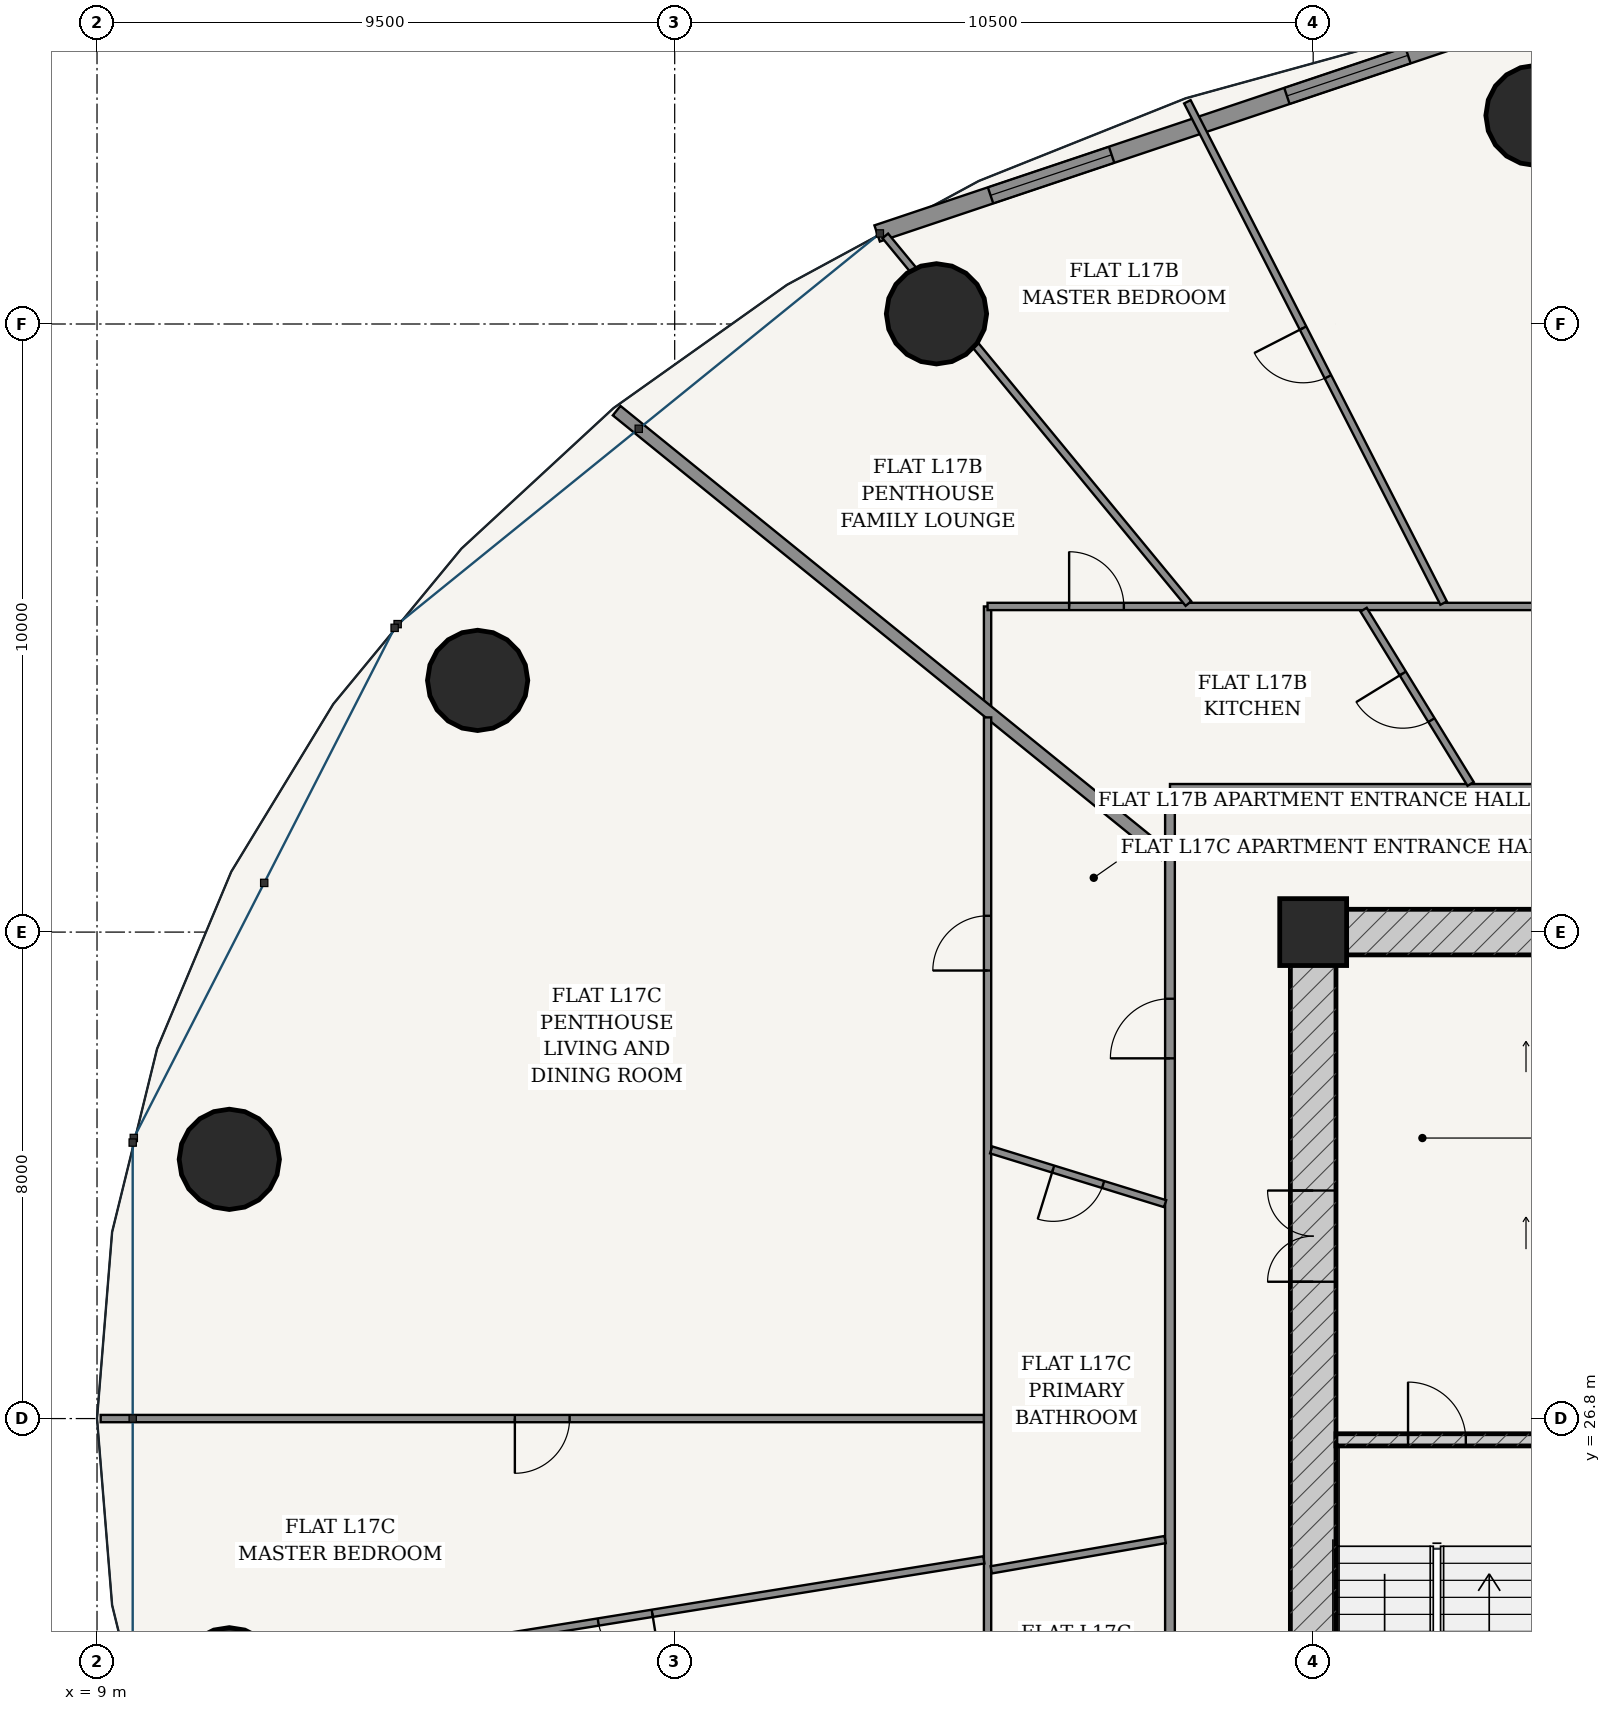
"""IFC4 building model, lengths in metres.
Left out: names, types, materials, properties, quantities, classifications, styles, units other than length and angle.
Written with IfcOpenShell. Run it as: python <this file> out.ifc"""

import sys

from ifc_helpers import new_model, si_unit, direction, frame, frame_2d, origin, origin_2d, place, context, subcontext, project, spatial, rectangle, hollow_circle, extrude, source, transform, mapped, element, fill, save


model = new_model("IFC4")
c1 = context("Model", 3, precision=1e-05, world=origin(), true_north=direction((-0.2419218956, 0.970295726276)))
c2 = subcontext(c1, "Body", "Model", "MODEL_VIEW")
j1 = project(units=[si_unit("LENGTHUNIT", "METRE"), si_unit("PLANEANGLEUNIT", "RADIAN")], contexts=[c1])
p1 = place(None, origin())
s1 = spatial("IfcSite", under=j1, at=p1, CompositionType="ELEMENT")
p2 = place(p1, origin())
s2 = spatial("IfcBuilding", under=s1, at=p2, CompositionType="ELEMENT")
p3 = place(p2, frame((0.0, 0.0, 67.2)))
s3 = spatial("IfcBuildingStorey", under=s2, at=p3, CompositionType="ELEMENT", Elevation=67.2)
p4 = place(p3, frame((29.0, 34.8, 0.0), z_axis=(0.0, 0.0, 1.0), x_axis=(1.0, 0.0, 0.0)))
e1 = element("IfcColumn", 1, at=p4, inside=s3, PredefinedType="COLUMN", context=c2, shape_type="SweptSolid", body=[
    extrude(rectangle(XDim=1.1, YDim=1.1, at=origin_2d()), origin(), (0.0, 0.0, 1.0), 3.6),
])
p5 = place(p3, frame((28.625, 34.8, 0.0), z_axis=(0.0, 0.0, 1.0), x_axis=(1.0, 0.0, 0.0)))
e2 = element("IfcWall", 2, at=p5, inside=s3, PredefinedType="SHEAR", context=c2, shape_type="SweptSolid", body=[
    extrude(rectangle(XDim=18.75, YDim=0.75, at=frame_2d((9.375, 0.0))), origin(), (0.0, 0.0, 1.0), 3.32),
])
p6 = place(p5, frame((7.407, 0.0, 0.0)))
e3 = element("IfcOpeningElement", 3, at=p6, cuts=e2, PredefinedType="OPENING", context=c2, shape_type="SweptSolid", body=[
    extrude(rectangle(XDim=0.86, YDim=2.1, at=frame_2d((0.43, 1.05))), frame((0.0, 0.385, 0.0), z_axis=(0.0, -1.0, 0.0), x_axis=(1.0, 0.0, 0.0)), (0.0, 0.0, 1.0), 0.77),
])
p7 = place(p5, frame((10.488, 0.0, 0.0)))
e4 = element("IfcOpeningElement", 4, at=p7, cuts=e2, PredefinedType="OPENING", context=c2, shape_type="SweptSolid", body=[
    extrude(rectangle(XDim=0.85, YDim=2.1, at=frame_2d((0.425, 1.05))), frame((0.0, 0.385, 0.0), z_axis=(0.0, -1.0, 0.0), x_axis=(1.0, 0.0, 0.0)), (0.0, 0.0, 1.0), 0.77),
])
p8 = place(p3, frame((29.0, 19.175, 0.0), z_axis=(0.0, 0.0, 1.0), x_axis=(0.0, 1.0, 0.0)))
e5 = element("IfcWall", 5, at=p8, inside=s3, PredefinedType="SHEAR", context=c2, shape_type="SweptSolid", body=[
    extrude(rectangle(XDim=15.25, YDim=0.75, at=frame_2d((7.625, 0.0))), origin(), (0.0, 0.0, 1.0), 3.32),
])
p9 = place(p8, frame((9.875, 0.0, 0.0)))
e6 = element("IfcOpeningElement", 6, at=p9, cuts=e5, PredefinedType="OPENING", context=c2, shape_type="SweptSolid", body=[
    extrude(rectangle(XDim=1.5, YDim=2.2, at=frame_2d((0.75, 1.1))), frame((0.0, 0.385, 0.0), z_axis=(0.0, -1.0, 0.0), x_axis=(1.0, 0.0, 0.0)), (0.0, 0.0, 1.0), 0.77),
])
p10 = place(p3, frame((29.375, 26.45, 0.0), z_axis=(0.0, 0.0, 1.0), x_axis=(1.0, 0.0, 0.0)))
e7 = element("IfcWall", 7, at=p10, inside=s3, PredefinedType="SOLIDWALL", context=c2, shape_type="SweptSolid", body=[
    extrude(rectangle(XDim=3.32, YDim=0.2, at=frame_2d((1.66, 0.0))), origin(), (0.0, 0.0, 1.0), 3.32),
])
p11 = place(p10, frame((1.185, 0.0, 0.0)))
e8 = element("IfcOpeningElement", 8, at=p11, cuts=e7, PredefinedType="OPENING", context=c2, shape_type="SweptSolid", body=[
    extrude(rectangle(XDim=0.95, YDim=2.15, at=frame_2d((0.475, 1.075))), frame((0.0, 0.11, 0.0), z_axis=(0.0, -1.0, 0.0), x_axis=(1.0, 0.0, 0.0)), (0.0, 0.0, 1.0), 0.22),
])
for number, where, z_axis, x_axis in (
    (9, (32.664, 48.23, 0.0), (0.0, 0.0, 1.0), (1.0, 0.0, 0.0)),
    (10, (22.805, 44.968, 0.0), (0.0, 0.0, 1.0), (1.0, 0.0, 0.0)),
    (11, (15.259, 38.939, 0.0), (0.0, 0.0, 1.0), (1.0, 0.0, 0.0)),
    (12, (11.176, 31.063, 0.0), (0.0, 0.0, 1.0), (1.0, 0.0, 0.0)),
    (13, (11.176, 22.537, 0.0), (0.0, 0.0, 1.0), (1.0, 0.0, 0.0)),
):
    element("IfcColumn", number, at=place(p3, frame(where, z_axis=z_axis, x_axis=x_axis)), inside=s3, PredefinedType="COLUMN", context=c2, shape_type="SweptSolid", body=[
        extrude(hollow_circle(Radius=0.825, WallThickness=0.05, at=origin_2d()), origin(), (0.0, 0.0, 1.0), 3.6),
    ])
p12 = place(p3, frame((32.424, 49.844, 0.0), z_axis=(0.0, 0.0, 1.0), x_axis=(-0.948041258496, -0.318147406385, 0.0)))
e14 = element("IfcWall", 14, at=p12, inside=s3, PredefinedType="SOLIDWALL", context=c2, shape_type="SweptSolid", body=[
    extrude(rectangle(XDim=11.175, YDim=0.28, at=frame_2d((5.588, 0.0))), origin(), (0.0, 0.0, 1.0), 3.32),
])
p13 = place(p12, frame((1.967, 0.0, 0.85)))
e15 = element("IfcOpeningElement", 15, at=p13, cuts=e14, PredefinedType="OPENING", context=c2, shape_type="SweptSolid", body=[
    extrude(rectangle(XDim=2.1, YDim=1.95, at=frame_2d((1.05, 0.975))), frame((0.0, 0.15, 0.0), z_axis=(0.0, -1.0, 0.0), x_axis=(1.0, 0.0, 0.0)), (0.0, 0.0, 1.0), 0.3),
])
p14 = place(p12, frame((7.108, 0.0, 0.85)))
e16 = element("IfcOpeningElement", 16, at=p14, cuts=e14, PredefinedType="OPENING", context=c2, shape_type="SweptSolid", body=[
    extrude(rectangle(XDim=2.1, YDim=1.95, at=frame_2d((1.05, 0.975))), frame((0.0, 0.15, 0.0), z_axis=(0.0, -1.0, 0.0), x_axis=(1.0, 0.0, 0.0)), (0.0, 0.0, 1.0), 0.3),
])
p15 = place(p3, frame((26.645, 37.155, 0.0), z_axis=(0.0, 0.0, 1.0), x_axis=(1.0, 0.0, 0.0)))
e17 = element("IfcWall", 17, at=p15, inside=s3, PredefinedType="PARTITIONING", context=c2, shape_type="SweptSolid", body=[
    extrude(rectangle(XDim=22.71, YDim=0.16, at=frame_2d((11.355, 0.0))), origin(), (0.0, 0.0, 1.0), 2.688),
])
p16 = place(p15, frame((7.859, 0.0, 0.0)))
e18 = element("IfcOpeningElement", 18, at=p16, cuts=e17, PredefinedType="OPENING", context=c2, shape_type="SweptSolid", body=[
    extrude(rectangle(XDim=0.98, YDim=2.2, at=frame_2d((0.49, 1.1))), frame((0.0, 0.09, 0.0), z_axis=(0.0, -1.0, 0.0), x_axis=(1.0, 0.0, 0.0)), (0.0, 0.0, 1.0), 0.18),
])
p17 = place(p3, frame((26.645, 16.525, 0.0), z_axis=(0.0, 0.0, 1.0), x_axis=(0.0, 1.0, 0.0)))
e19 = element("IfcWall", 19, at=p17, inside=s3, PredefinedType="PARTITIONING", context=c2, shape_type="SweptSolid", body=[
    extrude(rectangle(XDim=20.55, YDim=0.16, at=frame_2d((10.275, 0.0))), origin(), (0.0, 0.0, 1.0), 2.688),
])
p18 = place(p17, frame((16.199, 0.0, 0.0)))
e20 = element("IfcOpeningElement", 20, at=p18, cuts=e19, PredefinedType="OPENING", context=c2, shape_type="SweptSolid", body=[
    extrude(rectangle(XDim=0.98, YDim=2.2, at=frame_2d((0.49, 1.1))), frame((0.0, 0.09, 0.0), z_axis=(0.0, -1.0, 0.0), x_axis=(1.0, 0.0, 0.0)), (0.0, 0.0, 1.0), 0.18),
])
p19 = place(p3, frame((23.645, 38.534, 0.0), z_axis=(0.0, 0.0, 1.0), x_axis=(0.0, 1.0, 0.0)))
e21 = element("IfcWall", 21, at=p19, inside=s3, PredefinedType="PARTITIONING", context=c2, shape_type="SweptSolid", body=[
    extrude(rectangle(XDim=1.621, YDim=0.12, at=frame_2d((0.81, 0.0))), origin(), (0.0, 0.0, 1.0), 3.32),
])
p20 = place(p3, frame((23.645, 40.155, 0.0), z_axis=(0.0, 0.0, 1.0), x_axis=(1.0, 0.0, 0.0)))
e22 = element("IfcWall", 22, at=p20, inside=s3, PredefinedType="PARTITIONING", context=c2, shape_type="SweptSolid", body=[
    extrude(rectangle(XDim=21.08, YDim=0.12, at=frame_2d((10.54, 0.0))), origin(), (0.0, 0.0, 1.0), 2.688),
])
p21 = place(p20, frame((10.779, 0.0, 0.0)))
e23 = element("IfcOpeningElement", 23, at=p21, cuts=e22, PredefinedType="OPENING", context=c2, shape_type="SweptSolid", body=[
    extrude(rectangle(XDim=0.9, YDim=2.15, at=frame_2d((0.45, 1.075))), frame((0.0, 0.07, 0.0), z_axis=(0.0, -1.0, 0.0), x_axis=(1.0, 0.0, 0.0)), (0.0, 0.0, 1.0), 0.14),
])
p22 = place(p20, frame((1.342, 0.0, 0.0)))
e24 = element("IfcOpeningElement", 24, at=p22, cuts=e22, PredefinedType="OPENING", context=c2, shape_type="SweptSolid", body=[
    extrude(rectangle(XDim=0.9, YDim=2.15, at=frame_2d((0.45, 1.075))), frame((0.0, 0.07, 0.0), z_axis=(0.0, -1.0, 0.0), x_axis=(1.0, 0.0, 0.0)), (0.0, 0.0, 1.0), 0.14),
])
p23 = place(p3, frame((31.145, 40.21, 0.0), z_axis=(0.0, 0.0, 1.0), x_axis=(-0.455138005733, 0.89042090931, 0.0)))
e25 = element("IfcWall", 25, at=p23, inside=s3, PredefinedType="PARTITIONING", context=c2, shape_type="SweptSolid", body=[
    extrude(rectangle(XDim=9.259, YDim=0.12, at=frame_2d((4.629, 0.0))), origin(), (0.0, 0.0, 1.0), 2.762),
])
p24 = place(p23, frame((4.179, 0.0, 0.0)))
e26 = element("IfcOpeningElement", 26, at=p24, cuts=e25, PredefinedType="OPENING", context=c2, shape_type="SweptSolid", body=[
    extrude(rectangle(XDim=0.9, YDim=2.15, at=frame_2d((0.45, 1.075))), frame((0.0, 0.07, 0.0), z_axis=(0.0, -1.0, 0.0), x_axis=(1.0, 0.0, 0.0)), (0.0, 0.0, 1.0), 0.14),
])
p25 = place(p3, frame((26.948, 40.203, 0.0), z_axis=(0.0, 0.0, 1.0), x_axis=(-0.636191994442, 0.771530781115, 0.0)))
e27 = element("IfcWall", 27, at=p25, inside=s3, PredefinedType="PARTITIONING", context=c2, shape_type="SweptSolid", body=[
    extrude(rectangle(XDim=7.836, YDim=0.12, at=frame_2d((3.918, 0.0))), origin(), (0.0, 0.0, 1.0), 2.688),
])
p26 = place(p3, frame((31.589, 37.237, 0.0), z_axis=(0.0, 0.0, 1.0), x_axis=(-0.523404550994, 0.852084312729, 0.0)))
e28 = element("IfcWall", 28, at=p26, inside=s3, PredefinedType="PARTITIONING", context=c2, shape_type="SweptSolid", body=[
    extrude(rectangle(XDim=3.363, YDim=0.12, at=frame_2d((1.681, 0.0))), origin(), (0.0, 0.0, 1.0), 3.32),
])
p27 = place(p26, frame((1.231, 0.0, 0.0)))
e29 = element("IfcOpeningElement", 29, at=p27, cuts=e28, PredefinedType="OPENING", context=c2, shape_type="SweptSolid", body=[
    extrude(rectangle(XDim=0.9, YDim=2.15, at=frame_2d((0.45, 1.075))), frame((0.0, 0.07, 0.0), z_axis=(0.0, -1.0, 0.0), x_axis=(1.0, 0.0, 0.0)), (0.0, 0.0, 1.0), 0.14),
])
p28 = place(p3, frame((26.565, 36.066, 0.0), z_axis=(0.0, 0.0, 1.0), x_axis=(-0.77693672952, 0.629578683186, 0.0)))
e30 = element("IfcWall", 30, at=p28, inside=s3, PredefinedType="PARTITIONING", context=c2, shape_type="SweptSolid", body=[
    extrude(rectangle(XDim=11.609, YDim=0.2, at=frame_2d((5.805, 0.0))), origin(), (0.0, 0.0, 1.0), 2.762),
])
p29 = place(p3, frame((23.645, 19.129, 0.0), z_axis=(0.0, 0.0, 1.0), x_axis=(0.0, 1.0, 0.0)))
e31 = element("IfcWall", 31, at=p29, inside=s3, PredefinedType="PARTITIONING", context=c2, shape_type="SweptSolid", body=[
    extrude(rectangle(XDim=19.201, YDim=0.12, at=frame_2d((9.601, 0.0))), origin(), (0.0, 0.0, 1.0), 2.688),
])
p30 = place(p29, frame((15.038, 0.0, 0.0)))
e32 = element("IfcOpeningElement", 32, at=p30, cuts=e31, PredefinedType="OPENING", context=c2, shape_type="SweptSolid", body=[
    extrude(rectangle(XDim=0.9, YDim=2.15, at=frame_2d((0.45, 1.075))), frame((0.0, 0.07, 0.0), z_axis=(0.0, -1.0, 0.0), x_axis=(1.0, 0.0, 0.0)), (0.0, 0.0, 1.0), 0.14),
])
p31 = place(p29, frame((1.136, 0.0, 0.0)))
e33 = element("IfcOpeningElement", 33, at=p31, cuts=e31, PredefinedType="OPENING", context=c2, shape_type="SweptSolid", body=[
    extrude(rectangle(XDim=0.9, YDim=2.15, at=frame_2d((0.45, 1.075))), frame((0.0, 0.07, 0.0), z_axis=(0.0, -1.0, 0.0), x_axis=(1.0, 0.0, 0.0)), (0.0, 0.0, 1.0), 0.14),
])
p32 = place(p3, frame((23.583, 26.8, 0.0), z_axis=(0.0, 0.0, 1.0), x_axis=(-1.0, 0.0, 0.0)))
e34 = element("IfcWall", 34, at=p32, inside=s3, PredefinedType="PARTITIONING", context=c2, shape_type="SweptSolid", body=[
    extrude(rectangle(XDim=14.523, YDim=0.12, at=frame_2d((7.261, 0.0))), origin(), (0.0, 0.0, 1.0), 2.762),
])
p33 = place(p32, frame((6.812, 0.0, 0.0)))
e35 = element("IfcOpeningElement", 35, at=p33, cuts=e34, PredefinedType="OPENING", context=c2, shape_type="SweptSolid", body=[
    extrude(rectangle(XDim=0.9, YDim=2.15, at=frame_2d((0.45, 1.075))), frame((0.0, 0.07, 0.0), z_axis=(0.0, -1.0, 0.0), x_axis=(1.0, 0.0, 0.0)), (0.0, 0.0, 1.0), 0.14),
])
p34 = place(p3, frame((23.584, 24.476, 0.0), z_axis=(0.0, 0.0, 1.0), x_axis=(-0.987257727093, -0.159129445092, 0.0)))
e36 = element("IfcWall", 36, at=p34, inside=s3, PredefinedType="PARTITIONING", context=c2, shape_type="SweptSolid", body=[
    extrude(rectangle(XDim=14.086, YDim=0.12, at=frame_2d((7.043, 0.0))), origin(), (0.0, 0.0, 1.0), 2.688),
])
p35 = place(p34, frame((5.523, 0.0, 0.0)))
e37 = element("IfcOpeningElement", 37, at=p35, cuts=e36, PredefinedType="OPENING", context=c2, shape_type="SweptSolid", body=[
    extrude(rectangle(XDim=0.9, YDim=2.15, at=frame_2d((0.45, 1.075))), frame((0.0, 0.07, 0.0), z_axis=(0.0, -1.0, 0.0), x_axis=(1.0, 0.0, 0.0)), (0.0, 0.0, 1.0), 0.14),
])
p36 = place(p3, frame((26.565, 30.334, 0.0), z_axis=(0.0, 0.0, 1.0), x_axis=(-0.955416861585, 0.295260259093, 0.0)))
e38 = element("IfcWall", 38, at=p36, inside=s3, PredefinedType="PARTITIONING", context=c2, shape_type="SweptSolid", body=[
    extrude(rectangle(XDim=2.994, YDim=0.12, at=frame_2d((1.497, 0.0))), origin(), (0.0, 0.0, 1.0), 3.32),
])
p37 = place(p36, frame((1.067, 0.0, 0.0)))
e39 = element("IfcOpeningElement", 39, at=p37, cuts=e38, PredefinedType="OPENING", context=c2, shape_type="SweptSolid", body=[
    extrude(rectangle(XDim=0.86, YDim=2.15, at=frame_2d((0.43, 1.075))), frame((0.0, 0.07, 0.0), z_axis=(0.0, -1.0, 0.0), x_axis=(1.0, 0.0, 0.0)), (0.0, 0.0, 1.0), 0.14),
])
p38 = place(p3, frame((26.565, 24.81, 0.0), z_axis=(0.0, 0.0, 1.0), x_axis=(-0.985190752909, -0.171461891924, 0.0)))
e40 = element("IfcWall", 40, at=p38, inside=s3, PredefinedType="PARTITIONING", context=c2, shape_type="SweptSolid", body=[
    extrude(rectangle(XDim=2.902, YDim=0.12, at=frame_2d((1.451, 0.0))), origin(), (0.0, 0.0, 1.0), 2.688),
])
m1 = source(origin(), c2, "Body", "SweptSolid", [
    extrude(rectangle(XDim=2.1, YDim=1.95, at=frame_2d((1.05, 0.975))), frame((0.0, 0.03, 0.0), z_axis=(0.0, -1.0, 0.0), x_axis=(1.0, 0.0, 0.0)), (0.0, 0.0, 1.0), 0.06),
])
p39 = place(p13, origin())
e41 = element("IfcWindow", 41, at=p39, inside=s3, PartitioningType="SINGLE_PANEL", PredefinedType="WINDOW", context=c2, shape_type="MappedRepresentation", body=[
    mapped(m1, transform((0.0, 0.0, 0.0), scale=1.0)),
])
fill(e15, e41)
p40 = place(p14, origin())
e42 = element("IfcWindow", 42, at=p40, inside=s3, PartitioningType="SINGLE_PANEL", PredefinedType="WINDOW", context=c2, shape_type="MappedRepresentation", body=[
    mapped(m1, transform((0.0, 0.0, 0.0), scale=1.0)),
])
fill(e16, e42)
m2 = source(origin(), c2, "Body", "SweptSolid", [
    extrude(rectangle(XDim=1.5, YDim=2.2, at=frame_2d((0.75, 1.1))), frame((0.0, 0.025, 0.0), z_axis=(0.0, -1.0, 0.0), x_axis=(1.0, 0.0, 0.0)), (0.0, 0.0, 1.0), 0.05),
])
p41 = place(p9, origin())
e43 = element("IfcDoor", 43, at=p41, inside=s3, OperationType="DOUBLE_DOOR_SINGLE_SWING", PredefinedType="DOOR", context=c2, shape_type="MappedRepresentation", body=[
    mapped(m2, transform((0.0, 0.0, 0.0), scale=1.0)),
])
fill(e6, e43)
m3 = source(origin(), c2, "Body", "SweptSolid", [
    extrude(rectangle(XDim=0.95, YDim=2.15, at=frame_2d((0.475, 1.075))), frame((0.0, 0.025, 0.0), z_axis=(0.0, -1.0, 0.0), x_axis=(1.0, 0.0, 0.0)), (0.0, 0.0, 1.0), 0.05),
])
p42 = place(p11, origin())
e44 = element("IfcDoor", 44, at=p42, inside=s3, OperationType="SINGLE_SWING_LEFT", PredefinedType="DOOR", context=c2, shape_type="MappedRepresentation", body=[
    mapped(m3, transform((0.0, 0.0, 0.0), scale=1.0)),
])
fill(e8, e44)
m4 = source(origin(), c2, "Body", "SweptSolid", [
    extrude(rectangle(XDim=0.9, YDim=2.15, at=frame_2d((0.45, 1.075))), frame((0.0, 0.025, 0.0), z_axis=(0.0, -1.0, 0.0), x_axis=(1.0, 0.0, 0.0)), (0.0, 0.0, 1.0), 0.05),
])
p43 = place(p27, origin())
e45 = element("IfcDoor", 45, at=p43, inside=s3, OperationType="SINGLE_SWING_RIGHT", PredefinedType="DOOR", context=c2, shape_type="MappedRepresentation", body=[
    mapped(m4, transform((0.0, 0.0, 0.0), scale=1.0)),
])
fill(e29, e45)
p44 = place(p22, origin())
e46 = element("IfcDoor", 46, at=p44, inside=s3, OperationType="SINGLE_SWING_LEFT", PredefinedType="DOOR", context=c2, shape_type="MappedRepresentation", body=[
    mapped(m4, transform((0.0, 0.0, 0.0), scale=1.0)),
])
fill(e24, e46)
p45 = place(p24, origin())
e47 = element("IfcDoor", 47, at=p45, inside=s3, OperationType="SINGLE_SWING_RIGHT", PredefinedType="DOOR", context=c2, shape_type="MappedRepresentation", body=[
    mapped(m4, transform((0.0, 0.0, 0.0), scale=1.0)),
])
fill(e26, e47)
m5 = source(origin(), c2, "Body", "SweptSolid", [
    extrude(rectangle(XDim=0.98, YDim=2.2, at=frame_2d((0.49, 1.1))), frame((0.0, 0.025, 0.0), z_axis=(0.0, -1.0, 0.0), x_axis=(1.0, 0.0, 0.0)), (0.0, 0.0, 1.0), 0.05),
])
p46 = place(p18, origin())
e48 = element("IfcDoor", 48, at=p46, inside=s3, OperationType="SINGLE_SWING_LEFT", PredefinedType="DOOR", context=c2, shape_type="MappedRepresentation", body=[
    mapped(m5, transform((0.0, 0.0, 0.0), scale=1.0)),
])
fill(e20, e48)
m6 = source(origin(), c2, "Body", "SweptSolid", [
    extrude(rectangle(XDim=0.86, YDim=2.15, at=frame_2d((0.43, 1.075))), frame((0.0, 0.025, 0.0), z_axis=(0.0, -1.0, 0.0), x_axis=(1.0, 0.0, 0.0)), (0.0, 0.0, 1.0), 0.05),
])
p47 = place(p37, origin())
e49 = element("IfcDoor", 49, at=p47, inside=s3, OperationType="SINGLE_SWING_RIGHT", PredefinedType="DOOR", context=c2, shape_type="MappedRepresentation", body=[
    mapped(m6, transform((0.0, 0.0, 0.0), scale=1.0)),
])
fill(e39, e49)
p48 = place(p30, origin())
e50 = element("IfcDoor", 50, at=p48, inside=s3, OperationType="SINGLE_SWING_LEFT", PredefinedType="DOOR", context=c2, shape_type="MappedRepresentation", body=[
    mapped(m4, transform((0.0, 0.0, 0.0), scale=1.0)),
])
fill(e32, e50)
p49 = place(p33, origin())
e51 = element("IfcDoor", 51, at=p49, inside=s3, OperationType="SINGLE_SWING_RIGHT", PredefinedType="DOOR", context=c2, shape_type="MappedRepresentation", body=[
    mapped(m4, transform((0.0, 0.0, 0.0), scale=1.0)),
])
fill(e35, e51)
p50 = place(p35, origin())
e52 = element("IfcDoor", 52, at=p50, inside=s3, OperationType="SINGLE_SWING_LEFT", PredefinedType="DOOR", context=c2, shape_type="MappedRepresentation", body=[
    mapped(m4, transform((0.0, 0.0, 0.0), scale=1.0)),
])
fill(e37, e52)
save(model, sys.argv[1])
